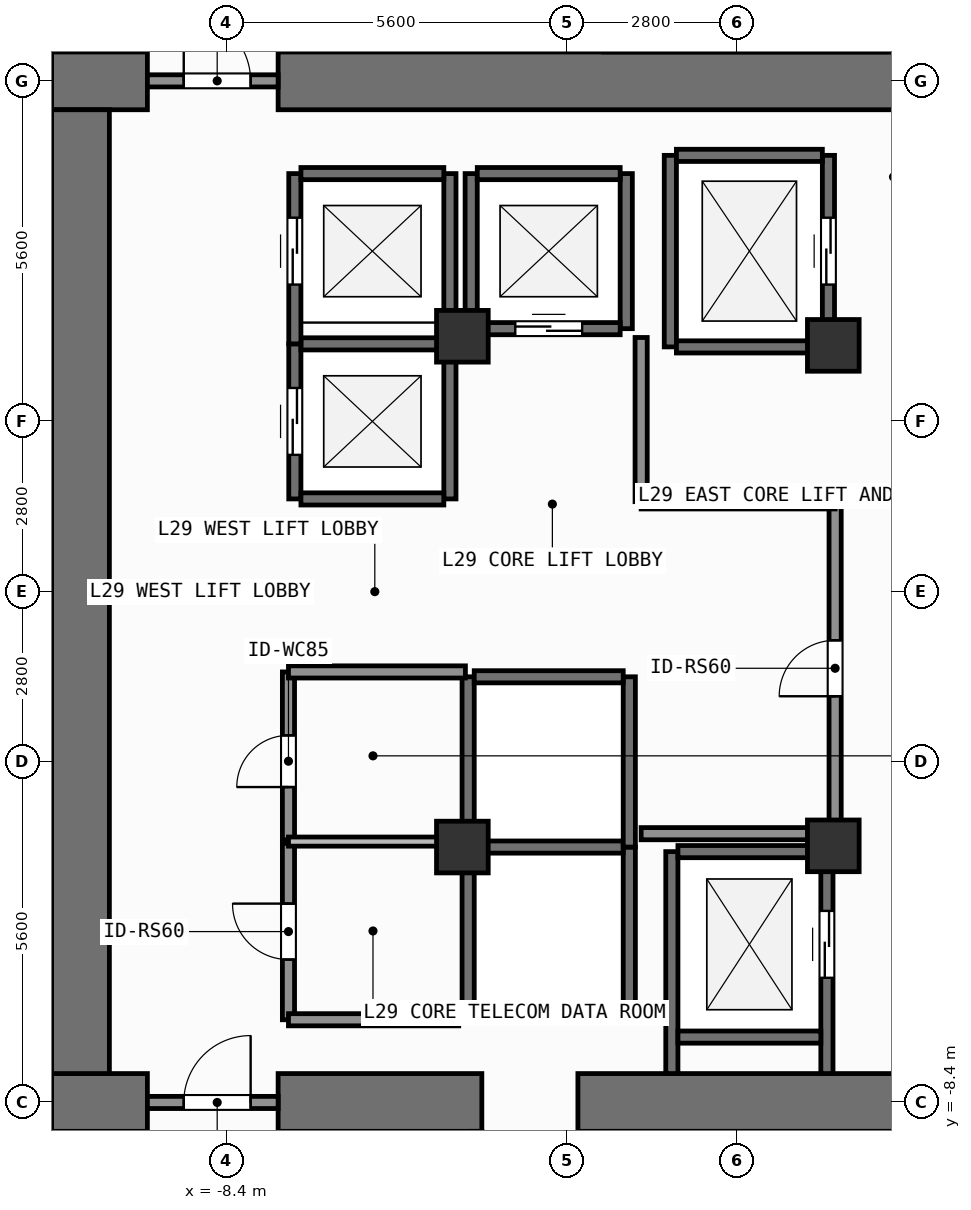
"""IFC4 building model, lengths in metres.
Left out: names, types, materials, properties, quantities, classifications, styles, units other than length and angle.
Written with IfcOpenShell. Run it as: python <this file> out.ifc"""

import sys

from ifc_helpers import new_model, si_unit, direction, frame, frame_2d, origin, origin_2d, place, context, subcontext, project, spatial, rectangle, extrude, element, fill, save


model = new_model("IFC4")
c1 = context("Model", 3, precision=1e-05, world=origin(), true_north=direction((0.0, 1.0)))
c2 = subcontext(c1, "Body", "Model", "MODEL_VIEW")
j1 = project(units=[si_unit("LENGTHUNIT", "METRE"), si_unit("PLANEANGLEUNIT", "RADIAN")], contexts=[c1])
p1 = place(None, origin())
s1 = spatial("IfcSite", under=j1, at=p1, CompositionType="ELEMENT")
p2 = place(p1, origin())
s2 = spatial("IfcBuilding", under=s1, at=p2, CompositionType="ELEMENT")
p3 = place(p2, frame((0.0, 0.0, 117.3)))
s3 = spatial("IfcBuildingStorey", under=s2, at=p3, CompositionType="ELEMENT", Elevation=117.3)
p4 = place(p3, frame((-11.275, -8.4, 0.0), z_axis=(0.0, 0.0, 1.0), x_axis=(1.0, 0.0, 0.0)))
e1 = element("IfcWall", 1, at=p4, inside=s3, PredefinedType="SHEAR", context=c2, shape_type="SweptSolid", body=[
    extrude(rectangle(XDim=1.575, YDim=0.95, at=frame_2d((0.788, 0.0))), origin(), (0.0, 0.0, 1.0), 3.9),
])
p5 = place(p3, frame((-7.55, -8.4, 0.0), z_axis=(0.0, 0.0, 1.0), x_axis=(1.0, 0.0, 0.0)))
e2 = element("IfcWall", 2, at=p5, inside=s3, PredefinedType="SHEAR", context=c2, shape_type="SweptSolid", body=[
    extrude(rectangle(XDim=3.35, YDim=0.95, at=frame_2d((1.675, 0.0))), origin(), (0.0, 0.0, 1.0), 3.9),
])
p6 = place(p3, frame((-2.62, -8.4, 0.0), z_axis=(0.0, 0.0, 1.0), x_axis=(1.0, 0.0, 0.0)))
e3 = element("IfcWall", 3, at=p6, inside=s3, PredefinedType="SHEAR", context=c2, shape_type="SweptSolid", body=[
    extrude(rectangle(XDim=7.27, YDim=0.95, at=frame_2d((3.635, 0.0))), origin(), (0.0, 0.0, 1.0), 3.9),
])
p7 = place(p3, frame((-11.275, 8.4, 0.0), z_axis=(0.0, 0.0, 1.0), x_axis=(1.0, 0.0, 0.0)))
e4 = element("IfcWall", 4, at=p7, inside=s3, PredefinedType="SHEAR", context=c2, shape_type="SweptSolid", body=[
    extrude(rectangle(XDim=1.575, YDim=0.95, at=frame_2d((0.788, 0.0))), origin(), (0.0, 0.0, 1.0), 3.9),
])
p8 = place(p3, frame((-7.55, 8.4, 0.0), z_axis=(0.0, 0.0, 1.0), x_axis=(1.0, 0.0, 0.0)))
e5 = element("IfcWall", 5, at=p8, inside=s3, PredefinedType="SHEAR", context=c2, shape_type="SweptSolid", body=[
    extrude(rectangle(XDim=16.425, YDim=0.95, at=frame_2d((8.212, 0.0))), origin(), (0.0, 0.0, 1.0), 3.9),
])
p9 = place(p3, frame((-10.8, -7.925, 0.0), z_axis=(0.0, 0.0, 1.0), x_axis=(0.0, 1.0, 0.0)))
e6 = element("IfcWall", 6, at=p9, inside=s3, PredefinedType="SHEAR", context=c2, shape_type="SweptSolid", body=[
    extrude(rectangle(XDim=15.85, YDim=0.95, at=frame_2d((7.925, 0.0))), origin(), (0.0, 0.0, 1.0), 3.9),
])
for number, where, z_axis, x_axis in (
    (7, (-4.52, -4.2, 0.0), (0.0, 0.0, 1.0), (1.0, 0.0, 0.0)),
    (8, (1.58, -4.18, 0.0), (0.0, 0.0, 1.0), (1.0, 0.0, 0.0)),
    (9, (1.58, 4.05, 0.0), (0.0, 0.0, 1.0), (1.0, 0.0, 0.0)),
    (10, (-4.52, 4.2, 0.0), (0.0, 0.0, 1.0), (1.0, 0.0, 0.0)),
):
    element("IfcColumn", number, at=place(p3, frame(where, z_axis=z_axis, x_axis=x_axis)), inside=s3, PredefinedType="COLUMN", context=c2, shape_type="SweptSolid", body=[
        extrude(rectangle(XDim=0.85, YDim=0.85, at=origin_2d()), origin(), (0.0, 0.0, 1.0), 3.9),
    ])
p10 = place(p3, frame((-7.275, 1.525, 0.0), z_axis=(0.0, 0.0, 1.0), x_axis=(0.0, 1.0, 0.0)))
e11 = element("IfcWall", 11, at=p10, inside=s3, PredefinedType="SHEAR", context=c2, shape_type="SweptSolid", body=[
    extrude(rectangle(XDim=2.55, YDim=0.2, at=frame_2d((1.275, 0.0))), origin(), (0.0, 0.0, 1.0), 3.68),
])
p11 = place(p10, frame((0.725, 0.0, 0.0)))
e12 = element("IfcOpeningElement", 12, at=p11, cuts=e11, PredefinedType="OPENING", context=c2, shape_type="SweptSolid", body=[
    extrude(rectangle(XDim=1.1, YDim=2.2, at=frame_2d((0.55, 1.1))), frame((0.0, 0.11, 0.0), z_axis=(0.0, -1.0, 0.0), x_axis=(1.0, 0.0, 0.0)), (0.0, 0.0, 1.0), 0.22),
])
p12 = place(p3, frame((-4.725, 1.525, 0.0), z_axis=(0.0, 0.0, 1.0), x_axis=(0.0, 1.0, 0.0)))
e13 = element("IfcWall", 13, at=p12, inside=s3, PredefinedType="SHEAR", context=c2, shape_type="SweptSolid", body=[
    extrude(rectangle(XDim=2.55, YDim=0.2, at=frame_2d((1.275, 0.0))), origin(), (0.0, 0.0, 1.0), 3.68),
])
for number, where, z_axis, x_axis in (
    (14, (-7.175, 1.525, 0.0), (0.0, 0.0, 1.0), (1.0, 0.0, 0.0)),
    (15, (-7.175, 4.075, 0.0), (0.0, 0.0, 1.0), (1.0, 0.0, 0.0)),
):
    element("IfcWall", number, at=place(p3, frame(where, z_axis=z_axis, x_axis=x_axis)), inside=s3, PredefinedType="SHEAR", context=c2, shape_type="SweptSolid", body=[
        extrude(rectangle(XDim=2.35, YDim=0.2, at=frame_2d((1.175, 0.0))), origin(), (0.0, 0.0, 1.0), 3.68),
    ])
p13 = place(p3, frame((-7.275, 4.075, 0.0), z_axis=(0.0, 0.0, 1.0), x_axis=(0.0, 1.0, 0.0)))
e16 = element("IfcWall", 16, at=p13, inside=s3, PredefinedType="SHEAR", context=c2, shape_type="SweptSolid", body=[
    extrude(rectangle(XDim=2.8, YDim=0.2, at=frame_2d((1.4, 0.0))), origin(), (0.0, 0.0, 1.0), 3.68),
])
p14 = place(p13, frame((0.975, 0.0, 0.0)))
e17 = element("IfcOpeningElement", 17, at=p14, cuts=e16, PredefinedType="OPENING", context=c2, shape_type="SweptSolid", body=[
    extrude(rectangle(XDim=1.1, YDim=2.2, at=frame_2d((0.55, 1.1))), frame((0.0, 0.11, 0.0), z_axis=(0.0, -1.0, 0.0), x_axis=(1.0, 0.0, 0.0)), (0.0, 0.0, 1.0), 0.22),
])
p15 = place(p3, frame((-4.725, 4.075, 0.0), z_axis=(0.0, 0.0, 1.0), x_axis=(0.0, 1.0, 0.0)))
e18 = element("IfcWall", 18, at=p15, inside=s3, PredefinedType="SHEAR", context=c2, shape_type="SweptSolid", body=[
    extrude(rectangle(XDim=2.8, YDim=0.2, at=frame_2d((1.4, 0.0))), origin(), (0.0, 0.0, 1.0), 3.68),
])
p16 = place(p3, frame((-7.175, 6.875, 0.0), z_axis=(0.0, 0.0, 1.0), x_axis=(1.0, 0.0, 0.0)))
e19 = element("IfcWall", 19, at=p16, inside=s3, PredefinedType="SHEAR", context=c2, shape_type="SweptSolid", body=[
    extrude(rectangle(XDim=2.35, YDim=0.2, at=frame_2d((1.175, 0.0))), origin(), (0.0, 0.0, 1.0), 3.68),
])
for number, where, z_axis, x_axis in (
    (20, (-4.375, 4.325, 0.0), (0.0, 0.0, 1.0), (0.0, 1.0, 0.0)),
    (21, (-1.825, 4.325, 0.0), (0.0, 0.0, 1.0), (0.0, 1.0, 0.0)),
):
    element("IfcWall", number, at=place(p3, frame(where, z_axis=z_axis, x_axis=x_axis)), inside=s3, PredefinedType="SHEAR", context=c2, shape_type="SweptSolid", body=[
        extrude(rectangle(XDim=2.55, YDim=0.2, at=frame_2d((1.275, 0.0))), origin(), (0.0, 0.0, 1.0), 3.68),
    ])
p17 = place(p3, frame((-4.275, 4.325, 0.0), z_axis=(0.0, 0.0, 1.0), x_axis=(1.0, 0.0, 0.0)))
e22 = element("IfcWall", 22, at=p17, inside=s3, PredefinedType="SHEAR", context=c2, shape_type="SweptSolid", body=[
    extrude(rectangle(XDim=2.35, YDim=0.2, at=frame_2d((1.175, 0.0))), origin(), (0.0, 0.0, 1.0), 3.68),
])
p18 = place(p17, frame((0.625, 0.0, 0.0)))
e23 = element("IfcOpeningElement", 23, at=p18, cuts=e22, PredefinedType="OPENING", context=c2, shape_type="SweptSolid", body=[
    extrude(rectangle(XDim=1.1, YDim=2.2, at=frame_2d((0.55, 1.1))), frame((0.0, 0.11, 0.0), z_axis=(0.0, -1.0, 0.0), x_axis=(1.0, 0.0, 0.0)), (0.0, 0.0, 1.0), 0.22),
])
p19 = place(p3, frame((-4.275, 6.875, 0.0), z_axis=(0.0, 0.0, 1.0), x_axis=(1.0, 0.0, 0.0)))
e24 = element("IfcWall", 24, at=p19, inside=s3, PredefinedType="SHEAR", context=c2, shape_type="SweptSolid", body=[
    extrude(rectangle(XDim=2.35, YDim=0.2, at=frame_2d((1.175, 0.0))), origin(), (0.0, 0.0, 1.0), 3.68),
])
for number, where, z_axis, x_axis in (
    (25, (-4.425, -7.0, 0.0), (0.0, 0.0, 1.0), (0.0, 1.0, 0.0)),
    (26, (-1.775, -7.0, 0.0), (0.0, 0.0, 1.0), (0.0, 1.0, 0.0)),
):
    element("IfcWall", number, at=place(p3, frame(where, z_axis=z_axis, x_axis=x_axis)), inside=s3, PredefinedType="SHEAR", context=c2, shape_type="SweptSolid", body=[
        extrude(rectangle(XDim=2.8, YDim=0.2, at=frame_2d((1.4, 0.0))), origin(), (0.0, 0.0, 1.0), 3.68),
    ])
for number, where, z_axis, x_axis in (
    (27, (-4.325, -7.0, 0.0), (0.0, 0.0, 1.0), (1.0, 0.0, 0.0)),
    (28, (-4.325, -4.2, 0.0), (0.0, 0.0, 1.0), (1.0, 0.0, 0.0)),
):
    element("IfcWall", number, at=place(p3, frame(where, z_axis=z_axis, x_axis=x_axis)), inside=s3, PredefinedType="SHEAR", context=c2, shape_type="SweptSolid", body=[
        extrude(rectangle(XDim=2.45, YDim=0.2, at=frame_2d((1.225, 0.0))), origin(), (0.0, 0.0, 1.0), 3.68),
    ])
for number, where, z_axis, x_axis in (
    (29, (-4.425, -4.2, 0.0), (0.0, 0.0, 1.0), (0.0, 1.0, 0.0)),
    (30, (-1.775, -4.2, 0.0), (0.0, 0.0, 1.0), (0.0, 1.0, 0.0)),
):
    element("IfcWall", number, at=place(p3, frame(where, z_axis=z_axis, x_axis=x_axis)), inside=s3, PredefinedType="SHEAR", context=c2, shape_type="SweptSolid", body=[
        extrude(rectangle(XDim=2.8, YDim=0.2, at=frame_2d((1.4, 0.0))), origin(), (0.0, 0.0, 1.0), 3.68),
    ])
p20 = place(p3, frame((-4.325, -1.4, 0.0), z_axis=(0.0, 0.0, 1.0), x_axis=(1.0, 0.0, 0.0)))
e31 = element("IfcWall", 31, at=p20, inside=s3, PredefinedType="SHEAR", context=c2, shape_type="SweptSolid", body=[
    extrude(rectangle(XDim=2.45, YDim=0.2, at=frame_2d((1.225, 0.0))), origin(), (0.0, 0.0, 1.0), 3.68),
])
p21 = place(p3, frame((-1.1, 4.025, 0.0), z_axis=(0.0, 0.0, 1.0), x_axis=(0.0, 1.0, 0.0)))
e32 = element("IfcWall", 32, at=p21, inside=s3, PredefinedType="SHEAR", context=c2, shape_type="SweptSolid", body=[
    extrude(rectangle(XDim=3.15, YDim=0.2, at=frame_2d((1.575, 0.0))), origin(), (0.0, 0.0, 1.0), 3.68),
])
p22 = place(p3, frame((1.5, 4.025, 0.0), z_axis=(0.0, 0.0, 1.0), x_axis=(0.0, 1.0, 0.0)))
e33 = element("IfcWall", 33, at=p22, inside=s3, PredefinedType="SHEAR", context=c2, shape_type="SweptSolid", body=[
    extrude(rectangle(XDim=3.15, YDim=0.2, at=frame_2d((1.575, 0.0))), origin(), (0.0, 0.0, 1.0), 3.68),
])
p23 = place(p22, frame((1.025, 0.0, 0.0)))
e34 = element("IfcOpeningElement", 34, at=p23, cuts=e33, PredefinedType="OPENING", context=c2, shape_type="SweptSolid", body=[
    extrude(rectangle(XDim=1.1, YDim=2.2, at=frame_2d((0.55, 1.1))), frame((0.0, 0.11, 0.0), z_axis=(0.0, -1.0, 0.0), x_axis=(1.0, 0.0, 0.0)), (0.0, 0.0, 1.0), 0.22),
])
for number, where, z_axis, x_axis in (
    (35, (-1.0, 4.025, 0.0), (0.0, 0.0, 1.0), (1.0, 0.0, 0.0)),
    (36, (-1.0, 7.175, 0.0), (0.0, 0.0, 1.0), (1.0, 0.0, 0.0)),
):
    element("IfcWall", number, at=place(p3, frame(where, z_axis=z_axis, x_axis=x_axis)), inside=s3, PredefinedType="SHEAR", context=c2, shape_type="SweptSolid", body=[
        extrude(rectangle(XDim=2.4, YDim=0.2, at=frame_2d((1.2, 0.0))), origin(), (0.0, 0.0, 1.0), 3.68),
    ])
p24 = place(p3, frame((-1.075, -7.925, 0.0), z_axis=(0.0, 0.0, 1.0), x_axis=(0.0, 1.0, 0.0)))
e37 = element("IfcWall", 37, at=p24, inside=s3, PredefinedType="SHEAR", context=c2, shape_type="SweptSolid", body=[
    extrude(rectangle(XDim=3.65, YDim=0.2, at=frame_2d((1.825, 0.0))), origin(), (0.0, 0.0, 1.0), 3.68),
])
p25 = place(p3, frame((1.475, -7.925, 0.0), z_axis=(0.0, 0.0, 1.0), x_axis=(0.0, 1.0, 0.0)))
e38 = element("IfcWall", 38, at=p25, inside=s3, PredefinedType="SHEAR", context=c2, shape_type="SweptSolid", body=[
    extrude(rectangle(XDim=3.65, YDim=0.2, at=frame_2d((1.825, 0.0))), origin(), (0.0, 0.0, 1.0), 3.68),
])
p26 = place(p25, frame((1.575, 0.0, 0.0)))
e39 = element("IfcOpeningElement", 39, at=p26, cuts=e38, PredefinedType="OPENING", context=c2, shape_type="SweptSolid", body=[
    extrude(rectangle(XDim=1.1, YDim=2.2, at=frame_2d((0.55, 1.1))), frame((0.0, 0.11, 0.0), z_axis=(0.0, -1.0, 0.0), x_axis=(1.0, 0.0, 0.0)), (0.0, 0.0, 1.0), 0.22),
])
for number, where, z_axis, x_axis in (
    (40, (-0.975, -7.325, 0.0), (0.0, 0.0, 1.0), (1.0, 0.0, 0.0)),
    (41, (-0.975, -4.275, 0.0), (0.0, 0.0, 1.0), (1.0, 0.0, 0.0)),
):
    element("IfcWall", number, at=place(p3, frame(where, z_axis=z_axis, x_axis=x_axis)), inside=s3, PredefinedType="SHEAR", context=c2, shape_type="SweptSolid", body=[
        extrude(rectangle(XDim=2.35, YDim=0.2, at=frame_2d((1.175, 0.0))), origin(), (0.0, 0.0, 1.0), 3.68),
    ])
p27 = place(p3, frame((-9.7, -8.4, 0.0), z_axis=(0.0, 0.0, 1.0), x_axis=(1.0, 0.0, 0.0)))
e42 = element("IfcWall", 42, at=p27, inside=s3, PredefinedType="SOLIDWALL", context=c2, shape_type="SweptSolid", body=[
    extrude(rectangle(XDim=2.15, YDim=0.2, at=frame_2d((1.075, 0.0))), origin(), (0.0, 0.0, 1.0), 2.72),
])
p28 = place(p27, frame((0.598, 0.0, 0.0)))
e43 = element("IfcOpeningElement", 43, at=p28, cuts=e42, PredefinedType="OPENING", context=c2, shape_type="SweptSolid", body=[
    extrude(rectangle(XDim=1.1, YDim=2.15, at=frame_2d((0.55, 1.075))), frame((0.0, 0.11, 0.0), z_axis=(0.0, -1.0, 0.0), x_axis=(1.0, 0.0, 0.0)), (0.0, 0.0, 1.0), 0.22),
])
p29 = place(p3, frame((-9.7, 8.4, 0.0), z_axis=(0.0, 0.0, 1.0), x_axis=(1.0, 0.0, 0.0)))
e44 = element("IfcWall", 44, at=p29, inside=s3, PredefinedType="SOLIDWALL", context=c2, shape_type="SweptSolid", body=[
    extrude(rectangle(XDim=2.15, YDim=0.2, at=frame_2d((1.075, 0.0))), origin(), (0.0, 0.0, 1.0), 2.72),
])
p30 = place(p29, frame((0.598, 0.0, 0.0)))
e45 = element("IfcOpeningElement", 45, at=p30, cuts=e44, PredefinedType="OPENING", context=c2, shape_type="SweptSolid", body=[
    extrude(rectangle(XDim=1.1, YDim=2.15, at=frame_2d((0.55, 1.075))), frame((0.0, 0.11, 0.0), z_axis=(0.0, -1.0, 0.0), x_axis=(1.0, 0.0, 0.0)), (0.0, 0.0, 1.0), 0.22),
])
p31 = place(p3, frame((1.61, -3.98, 0.0), z_axis=(0.0, 0.0, 1.0), x_axis=(0.0, 1.0, 0.0)))
e46 = element("IfcWall", 46, at=p31, inside=s3, PredefinedType="SOLIDWALL", context=c2, shape_type="SweptSolid", body=[
    extrude(rectangle(XDim=5.44, YDim=0.2, at=frame_2d((2.72, 0.0))), origin(), (0.0, 0.0, 1.0), 3.68),
])
p32 = place(p31, frame((2.26, 0.0, 0.0)))
e47 = element("IfcOpeningElement", 47, at=p32, cuts=e46, PredefinedType="OPENING", context=c2, shape_type="SweptSolid", body=[
    extrude(rectangle(XDim=0.92, YDim=2.1, at=frame_2d((0.46, 1.05))), frame((0.0, 0.11, 0.0), z_axis=(0.0, -1.0, 0.0), x_axis=(1.0, 0.0, 0.0)), (0.0, 0.0, 1.0), 0.22),
])
p33 = place(p3, frame((-7.38, -7.04, 0.0), z_axis=(0.0, 0.0, 1.0), x_axis=(0.0, 1.0, 0.0)))
e48 = element("IfcWall", 48, at=p33, inside=s3, PredefinedType="SOLIDWALL", context=c2, shape_type="SweptSolid", body=[
    extrude(rectangle(XDim=2.9, YDim=0.2, at=frame_2d((1.45, 0.0))), origin(), (0.0, 0.0, 1.0), 3.68),
])
p34 = place(p33, frame((0.99, 0.0, 0.0)))
e49 = element("IfcOpeningElement", 49, at=p34, cuts=e48, PredefinedType="OPENING", context=c2, shape_type="SweptSolid", body=[
    extrude(rectangle(XDim=0.92, YDim=2.1, at=frame_2d((0.46, 1.05))), frame((0.0, 0.11, 0.0), z_axis=(0.0, -1.0, 0.0), x_axis=(1.0, 0.0, 0.0)), (0.0, 0.0, 1.0), 0.22),
])
p35 = place(p3, frame((-7.38, -4.08, 0.0), z_axis=(0.0, 0.0, 1.0), x_axis=(0.0, 1.0, 0.0)))
e50 = element("IfcWall", 50, at=p35, inside=s3, PredefinedType="SOLIDWALL", context=c2, shape_type="SweptSolid", body=[
    extrude(rectangle(XDim=2.76, YDim=0.2, at=frame_2d((1.38, 0.0))), origin(), (0.0, 0.0, 1.0), 3.68),
])
p36 = place(p35, frame((0.867, 0.0, 0.0)))
e51 = element("IfcOpeningElement", 51, at=p36, cuts=e50, PredefinedType="OPENING", context=c2, shape_type="SweptSolid", body=[
    extrude(rectangle(XDim=0.85, YDim=2.1, at=frame_2d((0.425, 1.05))), frame((0.0, 0.11, 0.0), z_axis=(0.0, -1.0, 0.0), x_axis=(1.0, 0.0, 0.0)), (0.0, 0.0, 1.0), 0.22),
])
p37 = place(p3, frame((-7.38, -1.32, 0.0), z_axis=(0.0, 0.0, 1.0), x_axis=(1.0, 0.0, 0.0)))
e52 = element("IfcWall", 52, at=p37, inside=s3, PredefinedType="SOLIDWALL", context=c2, shape_type="SweptSolid", body=[
    extrude(rectangle(XDim=2.91, YDim=0.2, at=frame_2d((1.455, 0.0))), origin(), (0.0, 0.0, 1.0), 3.68),
])
p38 = place(p3, frame((-1.58, 1.48, 0.0), z_axis=(0.0, 0.0, 1.0), x_axis=(0.0, 1.0, 0.0)))
e53 = element("IfcWall", 53, at=p38, inside=s3, PredefinedType="SOLIDWALL", context=c2, shape_type="SweptSolid", body=[
    extrude(rectangle(XDim=2.7, YDim=0.2, at=frame_2d((1.35, 0.0))), origin(), (0.0, 0.0, 1.0), 3.68),
])
for number, where, z_axis, x_axis in (
    (54, (-1.58, -3.98, 0.0), (0.0, 0.0, 1.0), (1.0, 0.0, 0.0)),
    (55, (-1.58, 1.46, 0.0), (0.0, 0.0, 1.0), (1.0, 0.0, 0.0)),
):
    element("IfcWall", number, at=place(p3, frame(where, z_axis=z_axis, x_axis=x_axis)), inside=s3, PredefinedType="SOLIDWALL", context=c2, shape_type="SweptSolid", body=[
        extrude(rectangle(XDim=3.19, YDim=0.2, at=frame_2d((1.595, 0.0))), origin(), (0.0, 0.0, 1.0), 3.68),
    ])
p39 = place(p3, frame((-7.38, -7.04, 0.0), z_axis=(0.0, 0.0, 1.0), x_axis=(1.0, 0.0, 0.0)))
e56 = element("IfcWall", 56, at=p39, inside=s3, PredefinedType="SOLIDWALL", context=c2, shape_type="SweptSolid", body=[
    extrude(rectangle(XDim=2.8, YDim=0.2, at=frame_2d((1.4, 0.0))), origin(), (0.0, 0.0, 1.0), 3.68),
])
p40 = place(p3, frame((-7.38, -4.11, 0.0), z_axis=(0.0, 0.0, 1.0), x_axis=(1.0, 0.0, 0.0)))
e57 = element("IfcWall", 57, at=p40, inside=s3, PredefinedType="PARTITIONING", context=c2, shape_type="SweptSolid", body=[
    extrude(rectangle(XDim=2.8, YDim=0.15, at=frame_2d((1.4, 0.0))), origin(), (0.0, 0.0, 1.0), 3.68),
])
p41 = place(p11, origin())
e58 = element("IfcDoor", 58, at=p41, inside=s3, OperationType="SLIDING_TO_LEFT", PredefinedType="DOOR", context=c2, shape_type="SweptSolid", body=[
    extrude(rectangle(XDim=1.1, YDim=2.2, at=frame_2d((0.55, 1.1))), frame((0.0, 0.025, 0.0), z_axis=(0.0, -1.0, 0.0), x_axis=(1.0, 0.0, 0.0)), (0.0, 0.0, 1.0), 0.05),
])
fill(e12, e58)
p42 = place(p14, origin())
e59 = element("IfcDoor", 59, at=p42, inside=s3, OperationType="SLIDING_TO_LEFT", PredefinedType="DOOR", context=c2, shape_type="SweptSolid", body=[
    extrude(rectangle(XDim=1.1, YDim=2.2, at=frame_2d((0.55, 1.1))), frame((0.0, 0.025, 0.0), z_axis=(0.0, -1.0, 0.0), x_axis=(1.0, 0.0, 0.0)), (0.0, 0.0, 1.0), 0.05),
])
fill(e17, e59)
p43 = place(p18, origin())
e60 = element("IfcDoor", 60, at=p43, inside=s3, OperationType="SLIDING_TO_LEFT", PredefinedType="DOOR", context=c2, shape_type="SweptSolid", body=[
    extrude(rectangle(XDim=1.1, YDim=2.2, at=frame_2d((0.55, 1.1))), frame((0.0, 0.025, 0.0), z_axis=(0.0, -1.0, 0.0), x_axis=(1.0, 0.0, 0.0)), (0.0, 0.0, 1.0), 0.05),
])
fill(e23, e60)
p44 = place(p23, origin())
e61 = element("IfcDoor", 61, at=p44, inside=s3, OperationType="SLIDING_TO_LEFT", PredefinedType="DOOR", context=c2, shape_type="SweptSolid", body=[
    extrude(rectangle(XDim=1.1, YDim=2.2, at=frame_2d((0.55, 1.1))), frame((0.0, 0.025, 0.0), z_axis=(0.0, -1.0, 0.0), x_axis=(1.0, 0.0, 0.0)), (0.0, 0.0, 1.0), 0.05),
])
fill(e34, e61)
p45 = place(p26, origin())
e62 = element("IfcDoor", 62, at=p45, inside=s3, OperationType="SLIDING_TO_LEFT", PredefinedType="DOOR", context=c2, shape_type="SweptSolid", body=[
    extrude(rectangle(XDim=1.1, YDim=2.2, at=frame_2d((0.55, 1.1))), frame((0.0, 0.025, 0.0), z_axis=(0.0, -1.0, 0.0), x_axis=(1.0, 0.0, 0.0)), (0.0, 0.0, 1.0), 0.05),
])
fill(e39, e62)
p46 = place(p28, origin())
e63 = element("IfcDoor", 63, at=p46, inside=s3, OperationType="SINGLE_SWING_RIGHT", PredefinedType="DOOR", context=c2, shape_type="SweptSolid", body=[
    extrude(rectangle(XDim=1.1, YDim=2.15, at=frame_2d((0.55, 1.075))), frame((0.0, 0.025, 0.0), z_axis=(0.0, -1.0, 0.0), x_axis=(1.0, 0.0, 0.0)), (0.0, 0.0, 1.0), 0.05),
])
fill(e43, e63)
p47 = place(p30, origin())
e64 = element("IfcDoor", 64, at=p47, inside=s3, OperationType="SINGLE_SWING_LEFT", PredefinedType="DOOR", context=c2, shape_type="SweptSolid", body=[
    extrude(rectangle(XDim=1.1, YDim=2.15, at=frame_2d((0.55, 1.075))), frame((0.0, 0.025, 0.0), z_axis=(0.0, -1.0, 0.0), x_axis=(1.0, 0.0, 0.0)), (0.0, 0.0, 1.0), 0.05),
])
fill(e45, e64)
p48 = place(p32, origin())
e65 = element("IfcDoor", 65, at=p48, inside=s3, OperationType="SINGLE_SWING_LEFT", PredefinedType="DOOR", context=c2, shape_type="SweptSolid", body=[
    extrude(rectangle(XDim=0.92, YDim=2.1, at=frame_2d((0.46, 1.05))), frame((0.0, 0.025, 0.0), z_axis=(0.0, -1.0, 0.0), x_axis=(1.0, 0.0, 0.0)), (0.0, 0.0, 1.0), 0.05),
])
fill(e47, e65)
p49 = place(p34, origin())
e66 = element("IfcDoor", 66, at=p49, inside=s3, OperationType="SINGLE_SWING_RIGHT", PredefinedType="DOOR", context=c2, shape_type="SweptSolid", body=[
    extrude(rectangle(XDim=0.92, YDim=2.1, at=frame_2d((0.46, 1.05))), frame((0.0, 0.025, 0.0), z_axis=(0.0, -1.0, 0.0), x_axis=(1.0, 0.0, 0.0)), (0.0, 0.0, 1.0), 0.05),
])
fill(e49, e66)
p50 = place(p36, origin())
e67 = element("IfcDoor", 67, at=p50, inside=s3, OperationType="SINGLE_SWING_LEFT", PredefinedType="DOOR", context=c2, shape_type="SweptSolid", body=[
    extrude(rectangle(XDim=0.85, YDim=2.1, at=frame_2d((0.425, 1.05))), frame((0.0, 0.025, 0.0), z_axis=(0.0, -1.0, 0.0), x_axis=(1.0, 0.0, 0.0)), (0.0, 0.0, 1.0), 0.05),
])
fill(e51, e67)
save(model, sys.argv[1])
